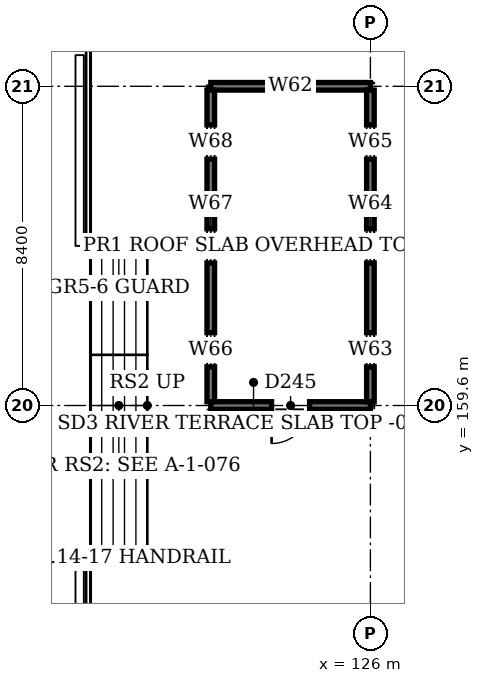
"""IFC4 building model, lengths in metres.
Left out: names, types, materials, properties, quantities, classifications, styles, units other than length and angle.
Written with IfcOpenShell. Run it as: python <this file> out.ifc"""

import sys

from ifc_helpers import new_model, si_unit, direction, frame, frame_2d, origin, place, context, subcontext, project, spatial, rectangle, extrude, element, fill, save


model = new_model("IFC4")
c1 = context("Model", 3, precision=1e-05, world=origin(), true_north=direction((0.0, 1.0)))
c2 = subcontext(c1, "Body", "Model", "MODEL_VIEW")
j1 = project(units=[si_unit("LENGTHUNIT", "METRE"), si_unit("PLANEANGLEUNIT", "RADIAN")], contexts=[c1])
p1 = place(None, origin())
s1 = spatial("IfcSite", under=j1, at=p1, CompositionType="ELEMENT")
p2 = place(p1, origin())
s2 = spatial("IfcBuilding", under=s1, at=p2, CompositionType="ELEMENT")
p3 = place(p2, origin())
s3 = spatial("IfcBuildingStorey", under=s2, at=p3, CompositionType="ELEMENT", Elevation=0.0)
p4 = place(p3, frame((121.8, 159.6, -0.9), z_axis=(0.0, 0.0, 1.0), x_axis=(1.0, 0.0, 0.0)))
e1 = element("IfcWall", 1, at=p4, inside=s3, PredefinedType="SOLIDWALL", context=c2, shape_type="SweptSolid", body=[
    extrude(rectangle(XDim=4.2, YDim=0.2, at=frame_2d((2.1, 0.0))), origin(), (0.0, 0.0, 1.0), 3.0),
])
p5 = place(p4, frame((1.6, 0.0, 0.0)))
e2 = element("IfcOpeningElement", 2, at=p5, cuts=e1, PredefinedType="OPENING", context=c2, shape_type="SweptSolid", body=[
    extrude(rectangle(XDim=1.0, YDim=2.1, at=frame_2d((0.5, 1.05))), frame((0.0, 0.11, 0.0), z_axis=(0.0, -1.0, 0.0), x_axis=(1.0, 0.0, 0.0)), (0.0, 0.0, 1.0), 0.22),
])
p6 = place(p3, frame((121.8, 168.0, -0.9), z_axis=(0.0, 0.0, 1.0), x_axis=(1.0, 0.0, 0.0)))
e3 = element("IfcWall", 3, at=p6, inside=s3, PredefinedType="SOLIDWALL", context=c2, shape_type="SweptSolid", body=[
    extrude(rectangle(XDim=4.2, YDim=0.2, at=frame_2d((2.1, 0.0))), origin(), (0.0, 0.0, 1.0), 3.0),
])
p7 = place(p6, frame((1.65, 0.0, 0.9)))
e4 = element("IfcOpeningElement", 4, at=p7, cuts=e3, PredefinedType="OPENING", context=c2, shape_type="SweptSolid", body=[
    extrude(rectangle(XDim=0.9, YDim=1.2, at=frame_2d((0.45, 0.6))), frame((0.0, 0.11, 0.0), z_axis=(0.0, -1.0, 0.0), x_axis=(1.0, 0.0, 0.0)), (0.0, 0.0, 1.0), 0.22),
])
p8 = place(p3, frame((121.8, 159.7, -0.9), z_axis=(0.0, 0.0, 1.0), x_axis=(0.0, 1.0, 0.0)))
e5 = element("IfcWall", 5, at=p8, inside=s3, PredefinedType="SOLIDWALL", context=c2, shape_type="SweptSolid", body=[
    extrude(rectangle(XDim=8.2, YDim=0.2, at=frame_2d((4.1, 0.0))), origin(), (0.0, 0.0, 1.0), 3.0),
])
p9 = place(p8, frame((0.917, 0.0, 0.9)))
e6 = element("IfcOpeningElement", 6, at=p9, cuts=e5, PredefinedType="OPENING", context=c2, shape_type="SweptSolid", body=[
    extrude(rectangle(XDim=0.9, YDim=1.2, at=frame_2d((0.45, 0.6))), frame((0.0, 0.11, 0.0), z_axis=(0.0, -1.0, 0.0), x_axis=(1.0, 0.0, 0.0)), (0.0, 0.0, 1.0), 0.22),
])
p10 = place(p8, frame((3.65, 0.0, 0.9)))
e7 = element("IfcOpeningElement", 7, at=p10, cuts=e5, PredefinedType="OPENING", context=c2, shape_type="SweptSolid", body=[
    extrude(rectangle(XDim=0.9, YDim=1.2, at=frame_2d((0.45, 0.6))), frame((0.0, 0.11, 0.0), z_axis=(0.0, -1.0, 0.0), x_axis=(1.0, 0.0, 0.0)), (0.0, 0.0, 1.0), 0.22),
])
p11 = place(p8, frame((6.383, 0.0, 0.9)))
e8 = element("IfcOpeningElement", 8, at=p11, cuts=e5, PredefinedType="OPENING", context=c2, shape_type="SweptSolid", body=[
    extrude(rectangle(XDim=0.9, YDim=1.2, at=frame_2d((0.45, 0.6))), frame((0.0, 0.11, 0.0), z_axis=(0.0, -1.0, 0.0), x_axis=(1.0, 0.0, 0.0)), (0.0, 0.0, 1.0), 0.22),
])
p12 = place(p3, frame((126.0, 159.7, -0.9), z_axis=(0.0, 0.0, 1.0), x_axis=(0.0, 1.0, 0.0)))
e9 = element("IfcWall", 9, at=p12, inside=s3, PredefinedType="SOLIDWALL", context=c2, shape_type="SweptSolid", body=[
    extrude(rectangle(XDim=8.2, YDim=0.2, at=frame_2d((4.1, 0.0))), origin(), (0.0, 0.0, 1.0), 3.0),
])
p13 = place(p12, frame((0.917, 0.0, 0.9)))
e10 = element("IfcOpeningElement", 10, at=p13, cuts=e9, PredefinedType="OPENING", context=c2, shape_type="SweptSolid", body=[
    extrude(rectangle(XDim=0.9, YDim=1.2, at=frame_2d((0.45, 0.6))), frame((0.0, 0.11, 0.0), z_axis=(0.0, -1.0, 0.0), x_axis=(1.0, 0.0, 0.0)), (0.0, 0.0, 1.0), 0.22),
])
p14 = place(p12, frame((3.65, 0.0, 0.9)))
e11 = element("IfcOpeningElement", 11, at=p14, cuts=e9, PredefinedType="OPENING", context=c2, shape_type="SweptSolid", body=[
    extrude(rectangle(XDim=0.9, YDim=1.2, at=frame_2d((0.45, 0.6))), frame((0.0, 0.11, 0.0), z_axis=(0.0, -1.0, 0.0), x_axis=(1.0, 0.0, 0.0)), (0.0, 0.0, 1.0), 0.22),
])
p15 = place(p12, frame((6.383, 0.0, 0.9)))
e12 = element("IfcOpeningElement", 12, at=p15, cuts=e9, PredefinedType="OPENING", context=c2, shape_type="SweptSolid", body=[
    extrude(rectangle(XDim=0.9, YDim=1.2, at=frame_2d((0.45, 0.6))), frame((0.0, 0.11, 0.0), z_axis=(0.0, -1.0, 0.0), x_axis=(1.0, 0.0, 0.0)), (0.0, 0.0, 1.0), 0.22),
])
p16 = place(p5, frame((1.0, 0.0, 0.0), z_axis=(0.0, 0.0, 1.0), x_axis=(-1.0, 0.0, 0.0)))
e13 = element("IfcDoor", 13, at=p16, inside=s3, OperationType="SINGLE_SWING_RIGHT", PredefinedType="DOOR", context=c2, shape_type="SweptSolid", body=[
    extrude(rectangle(XDim=1.0, YDim=2.1, at=frame_2d((0.5, 1.05))), frame((0.0, 0.025, 0.0), z_axis=(0.0, -1.0, 0.0), x_axis=(1.0, 0.0, 0.0)), (0.0, 0.0, 1.0), 0.05),
])
fill(e2, e13)
p17 = place(p7, origin())
e14 = element("IfcWindow", 14, at=p17, inside=s3, PartitioningType="SINGLE_PANEL", PredefinedType="WINDOW", context=c2, shape_type="SweptSolid", body=[
    extrude(rectangle(XDim=0.9, YDim=1.2, at=frame_2d((0.45, 0.6))), frame((0.0, 0.03, 0.0), z_axis=(0.0, -1.0, 0.0), x_axis=(1.0, 0.0, 0.0)), (0.0, 0.0, 1.0), 0.06),
])
fill(e4, e14)
p18 = place(p13, origin())
e15 = element("IfcWindow", 15, at=p18, inside=s3, PartitioningType="SINGLE_PANEL", PredefinedType="WINDOW", context=c2, shape_type="SweptSolid", body=[
    extrude(rectangle(XDim=0.9, YDim=1.2, at=frame_2d((0.45, 0.6))), frame((0.0, 0.03, 0.0), z_axis=(0.0, -1.0, 0.0), x_axis=(1.0, 0.0, 0.0)), (0.0, 0.0, 1.0), 0.06),
])
fill(e10, e15)
p19 = place(p14, origin())
e16 = element("IfcWindow", 16, at=p19, inside=s3, PartitioningType="SINGLE_PANEL", PredefinedType="WINDOW", context=c2, shape_type="SweptSolid", body=[
    extrude(rectangle(XDim=0.9, YDim=1.2, at=frame_2d((0.45, 0.6))), frame((0.0, 0.03, 0.0), z_axis=(0.0, -1.0, 0.0), x_axis=(1.0, 0.0, 0.0)), (0.0, 0.0, 1.0), 0.06),
])
fill(e11, e16)
p20 = place(p15, origin())
e17 = element("IfcWindow", 17, at=p20, inside=s3, PartitioningType="SINGLE_PANEL", PredefinedType="WINDOW", context=c2, shape_type="SweptSolid", body=[
    extrude(rectangle(XDim=0.9, YDim=1.2, at=frame_2d((0.45, 0.6))), frame((0.0, 0.03, 0.0), z_axis=(0.0, -1.0, 0.0), x_axis=(1.0, 0.0, 0.0)), (0.0, 0.0, 1.0), 0.06),
])
fill(e12, e17)
p21 = place(p9, origin())
e18 = element("IfcWindow", 18, at=p21, inside=s3, PartitioningType="SINGLE_PANEL", PredefinedType="WINDOW", context=c2, shape_type="SweptSolid", body=[
    extrude(rectangle(XDim=0.9, YDim=1.2, at=frame_2d((0.45, 0.6))), frame((0.0, 0.03, 0.0), z_axis=(0.0, -1.0, 0.0), x_axis=(1.0, 0.0, 0.0)), (0.0, 0.0, 1.0), 0.06),
])
fill(e6, e18)
p22 = place(p10, origin())
e19 = element("IfcWindow", 19, at=p22, inside=s3, PartitioningType="SINGLE_PANEL", PredefinedType="WINDOW", context=c2, shape_type="SweptSolid", body=[
    extrude(rectangle(XDim=0.9, YDim=1.2, at=frame_2d((0.45, 0.6))), frame((0.0, 0.03, 0.0), z_axis=(0.0, -1.0, 0.0), x_axis=(1.0, 0.0, 0.0)), (0.0, 0.0, 1.0), 0.06),
])
fill(e7, e19)
p23 = place(p11, origin())
e20 = element("IfcWindow", 20, at=p23, inside=s3, PartitioningType="SINGLE_PANEL", PredefinedType="WINDOW", context=c2, shape_type="SweptSolid", body=[
    extrude(rectangle(XDim=0.9, YDim=1.2, at=frame_2d((0.45, 0.6))), frame((0.0, 0.03, 0.0), z_axis=(0.0, -1.0, 0.0), x_axis=(1.0, 0.0, 0.0)), (0.0, 0.0, 1.0), 0.06),
])
fill(e8, e20)
save(model, sys.argv[1])
